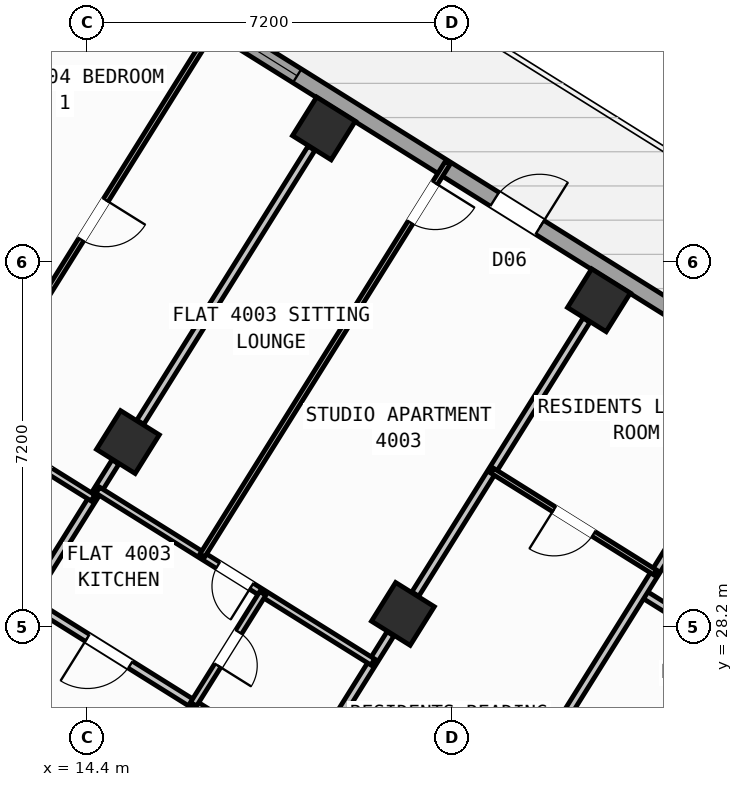
"""IFC4 building model, lengths in metres.
Left out: names, types, materials, properties, quantities, classifications, styles, units other than length and angle.
Written with IfcOpenShell. Run it as: python <this file> out.ifc"""

import sys

from ifc_helpers import new_model, si_unit, direction, frame, frame_2d, origin, origin_2d, place, context, subcontext, project, spatial, rectangle, hollow_rectangle, extrude, source, transform, mapped, element, fill, save


model = new_model("IFC4")
c1 = context("Model", 3, precision=1e-05, world=origin(), true_north=direction((0.0, 1.0)))
c2 = subcontext(c1, "Body", "Model", "MODEL_VIEW")
j1 = project(units=[si_unit("LENGTHUNIT", "METRE"), si_unit("PLANEANGLEUNIT", "RADIAN")], contexts=[c1])
p1 = place(None, origin())
s1 = spatial("IfcSite", under=j1, at=p1, CompositionType="ELEMENT")
p2 = place(p1, origin())
s2 = spatial("IfcBuilding", under=s1, at=p2, CompositionType="ELEMENT")
p3 = place(p2, frame((0.0, 0.0, 158.7)))
s3 = spatial("IfcBuildingStorey", under=s2, at=p3, CompositionType="ELEMENT", Elevation=158.7)
m1 = source(origin(), c2, "Body", "SweptSolid", [
    extrude(hollow_rectangle(XDim=0.9, YDim=0.9, WallThickness=0.036, at=origin_2d()), origin(), (0.0, 0.0, 1.0), 3.6),
])
for number, where, z_axis, x_axis in (
    (1, (24.5, 34.643, 0.0), (0.0, 0.0, 1.0), (-0.848, 0.53, 0.0)),
    (2, (20.632, 28.452, 0.0), (0.0, 0.0, 1.0), (-0.848, 0.53, 0.0)),
    (3, (19.073, 38.034, 0.0), (0.0, 0.0, 1.0), (-0.848, 0.53, 0.0)),
    (4, (15.205, 31.844, 0.0), (0.0, 0.0, 1.0), (-0.848, 0.53, 0.0)),
):
    element("IfcColumn", number, at=place(p3, frame(where, z_axis=z_axis, x_axis=x_axis)), inside=s3, PredefinedType="COLUMN", context=c2, shape_type="MappedRepresentation", body=[
        mapped(m1, transform((0.0, 0.0, 0.0), scale=1.0)),
    ])
p4 = place(p3, frame((2.415, 23.452, 0.0), z_axis=(0.0, 0.0, 1.0), x_axis=(0.52991049553, 0.848053575387, 0.0)))
e5 = element("IfcWall", 5, at=p4, inside=s3, PredefinedType="STANDARD", context=c2, shape_type="SweptSolid", body=[
    extrude(rectangle(XDim=21.587, YDim=0.32, at=frame_2d((10.794, 0.0))), origin(), (0.0, 0.0, 1.0), 2.775),
])
p5 = place(p4, frame((1.406, 0.0, 0.8)))
e6 = element("IfcOpeningElement", 6, at=p5, cuts=e5, PredefinedType="OPENING", context=c2, shape_type="SweptSolid", body=[
    extrude(rectangle(XDim=2.1, YDim=1.55, at=frame_2d((1.05, 0.775))), frame((0.0, 0.17, 0.0), z_axis=(0.0, -1.0, 0.0), x_axis=(1.0, 0.0, 0.0)), (0.0, 0.0, 1.0), 0.34),
])
p6 = place(p4, frame((10.949, 0.0, 1.0)))
e7 = element("IfcOpeningElement", 7, at=p6, cuts=e5, PredefinedType="OPENING", context=c2, shape_type="SweptSolid", body=[
    extrude(rectangle(XDim=0.9, YDim=1.25, at=frame_2d((0.45, 0.625))), frame((0.0, 0.17, 0.0), z_axis=(0.0, -1.0, 0.0), x_axis=(1.0, 0.0, 0.0)), (0.0, 0.0, 1.0), 0.34),
])
p7 = place(p4, frame((15.369, 0.0, 0.85)))
e8 = element("IfcOpeningElement", 8, at=p7, cuts=e5, PredefinedType="OPENING", context=c2, shape_type="SweptSolid", body=[
    extrude(rectangle(XDim=1.5, YDim=1.5, at=frame_2d((0.75, 0.75))), frame((0.0, 0.17, 0.0), z_axis=(0.0, -1.0, 0.0), x_axis=(1.0, 0.0, 0.0)), (0.0, 0.0, 1.0), 0.34),
])
p8 = place(p4, frame((18.219, 0.0, 0.85)))
e9 = element("IfcOpeningElement", 9, at=p8, cuts=e5, PredefinedType="OPENING", context=c2, shape_type="SweptSolid", body=[
    extrude(rectangle(XDim=1.5, YDim=1.5, at=frame_2d((0.75, 0.75))), frame((0.0, 0.17, 0.0), z_axis=(0.0, -1.0, 0.0), x_axis=(1.0, 0.0, 0.0)), (0.0, 0.0, 1.0), 0.34),
])
p9 = place(p3, frame((14.138, 41.825, 0.0), z_axis=(0.0, 0.0, 1.0), x_axis=(0.848046498049, -0.529921821731, 0.0)))
e10 = element("IfcWall", 10, at=p9, inside=s3, PredefinedType="STANDARD", context=c2, shape_type="SweptSolid", body=[
    extrude(rectangle(XDim=31.588, YDim=0.32, at=frame_2d((15.794, 0.0))), origin(), (0.0, 0.0, 1.0), 3.35),
])
p10 = place(p9, frame((9.792, 0.0, 0.0)))
e11 = element("IfcOpeningElement", 11, at=p10, cuts=e10, PredefinedType="OPENING", context=c2, shape_type="SweptSolid", body=[
    extrude(rectangle(XDim=1.05, YDim=2.15, at=frame_2d((0.525, 1.075))), frame((0.0, 0.17, 0.0), z_axis=(0.0, -1.0, 0.0), x_axis=(1.0, 0.0, 0.0)), (0.0, 0.0, 1.0), 0.34),
])
p11 = place(p9, frame((0.791, 0.0, 0.85)))
e12 = element("IfcOpeningElement", 12, at=p11, cuts=e10, PredefinedType="OPENING", context=c2, shape_type="SweptSolid", body=[
    extrude(rectangle(XDim=1.8, YDim=1.5, at=frame_2d((0.9, 0.75))), frame((0.0, 0.17, 0.0), z_axis=(0.0, -1.0, 0.0), x_axis=(1.0, 0.0, 0.0)), (0.0, 0.0, 1.0), 0.34),
])
p12 = place(p9, frame((3.996, 0.0, 0.95)))
e13 = element("IfcOpeningElement", 13, at=p12, cuts=e10, PredefinedType="OPENING", context=c2, shape_type="SweptSolid", body=[
    extrude(rectangle(XDim=1.2, YDim=1.4, at=frame_2d((0.6, 0.7))), frame((0.0, 0.17, 0.0), z_axis=(0.0, -1.0, 0.0), x_axis=(1.0, 0.0, 0.0)), (0.0, 0.0, 1.0), 0.34),
])
p13 = place(p9, frame((13.874, 0.0, 0.85)))
e14 = element("IfcOpeningElement", 14, at=p13, cuts=e10, PredefinedType="OPENING", context=c2, shape_type="SweptSolid", body=[
    extrude(rectangle(XDim=1.5, YDim=1.5, at=frame_2d((0.75, 0.75))), frame((0.0, 0.17, 0.0), z_axis=(0.0, -1.0, 0.0), x_axis=(1.0, 0.0, 0.0)), (0.0, 0.0, 1.0), 0.34),
])
p14 = place(p9, frame((17.104, 0.0, 1.0)))
e15 = element("IfcOpeningElement", 15, at=p14, cuts=e10, PredefinedType="OPENING", context=c2, shape_type="SweptSolid", body=[
    extrude(rectangle(XDim=0.9, YDim=1.25, at=frame_2d((0.45, 0.625))), frame((0.0, 0.17, 0.0), z_axis=(0.0, -1.0, 0.0), x_axis=(1.0, 0.0, 0.0)), (0.0, 0.0, 1.0), 0.34),
])
p15 = place(p9, frame((22.144, 0.0, 1.0)))
e16 = element("IfcOpeningElement", 16, at=p15, cuts=e10, PredefinedType="OPENING", context=c2, shape_type="SweptSolid", body=[
    extrude(rectangle(XDim=0.9, YDim=1.25, at=frame_2d((0.45, 0.625))), frame((0.0, 0.17, 0.0), z_axis=(0.0, -1.0, 0.0), x_axis=(1.0, 0.0, 0.0)), (0.0, 0.0, 1.0), 0.34),
])
p16 = place(p9, frame((27.744, 0.0, 1.0)))
e17 = element("IfcOpeningElement", 17, at=p16, cuts=e10, PredefinedType="OPENING", context=c2, shape_type="SweptSolid", body=[
    extrude(rectangle(XDim=0.9, YDim=1.25, at=frame_2d((0.45, 0.625))), frame((0.0, 0.17, 0.0), z_axis=(0.0, -1.0, 0.0), x_axis=(1.0, 0.0, 0.0)), (0.0, 0.0, 1.0), 0.34),
])
p17 = place(p3, frame((27.57, 27.478, 0.0), z_axis=(0.0, 0.0, 1.0), x_axis=(-0.848050851465, 0.529914854792, 0.0)))
e18 = element("IfcWall", 18, at=p17, inside=s3, PredefinedType="PARTITIONING", context=c2, shape_type="SweptSolid", body=[
    extrude(rectangle(XDim=2.61, YDim=0.16, at=frame_2d((1.305, 0.0))), origin(), (0.0, 0.0, 1.0), 3.34),
])
p18 = place(p17, frame((0.95, 0.0, 0.0)))
e19 = element("IfcOpeningElement", 19, at=p18, cuts=e18, PredefinedType="OPENING", context=c2, shape_type="SweptSolid", body=[
    extrude(rectangle(XDim=0.86, YDim=2.05, at=frame_2d((0.43, 1.025))), frame((0.0, 0.09, 0.0), z_axis=(0.0, -1.0, 0.0), x_axis=(1.0, 0.0, 0.0)), (0.0, 0.0, 1.0), 0.18),
])
p19 = place(p3, frame((27.953, 33.016, 0.0), z_axis=(0.0, 0.0, 1.0), x_axis=(-0.529905022231, -0.848056995381, 0.0)))
e20 = element("IfcWall", 20, at=p19, inside=s3, PredefinedType="PARTITIONING", context=c2, shape_type="SweptSolid", body=[
    extrude(rectangle(XDim=11.45, YDim=0.16, at=frame_2d((5.725, 0.0))), origin(), (0.0, 0.0, 1.0), 3.34),
])
p20 = place(p3, frame((21.885, 23.306, 0.0), z_axis=(0.0, 0.0, 1.0), x_axis=(-0.848052408131, 0.529912363569, 0.0)))
e21 = element("IfcWall", 21, at=p20, inside=s3, PredefinedType="PARTITIONING", context=c2, shape_type="SweptSolid", body=[
    extrude(rectangle(XDim=16.73, YDim=0.16, at=frame_2d((8.365, 0.0))), origin(), (0.0, 0.0, 1.0), 3.34),
])
p21 = place(p20, frame((1.395, 0.0, 0.0)))
e22 = element("IfcOpeningElement", 22, at=p21, cuts=e21, PredefinedType="OPENING", context=c2, shape_type="SweptSolid", body=[
    extrude(rectangle(XDim=1.0, YDim=2.1, at=frame_2d((0.5, 1.05))), frame((0.0, 0.09, 0.0), z_axis=(0.0, -1.0, 0.0), x_axis=(1.0, 0.0, 0.0)), (0.0, 0.0, 1.0), 0.18),
])
p22 = place(p20, frame((7.82, 0.0, 0.0)))
e23 = element("IfcOpeningElement", 23, at=p22, cuts=e21, PredefinedType="OPENING", context=c2, shape_type="SweptSolid", body=[
    extrude(rectangle(XDim=1.0, YDim=2.1, at=frame_2d((0.5, 1.05))), frame((0.0, 0.09, 0.0), z_axis=(0.0, -1.0, 0.0), x_axis=(1.0, 0.0, 0.0)), (0.0, 0.0, 1.0), 0.18),
])
p23 = place(p20, frame((11.14, 0.0, 0.0)))
e24 = element("IfcOpeningElement", 24, at=p23, cuts=e21, PredefinedType="OPENING", context=c2, shape_type="SweptSolid", body=[
    extrude(rectangle(XDim=1.0, YDim=2.1, at=frame_2d((0.5, 1.05))), frame((0.0, 0.09, 0.0), z_axis=(0.0, -1.0, 0.0), x_axis=(1.0, 0.0, 0.0)), (0.0, 0.0, 1.0), 0.18),
])
p24 = place(p3, frame((20.719, 21.44, 0.0), z_axis=(0.0, 0.0, 1.0), x_axis=(-0.848048310262, 0.529918921593, 0.0)))
e25 = element("IfcWall", 25, at=p24, inside=s3, PredefinedType="PARTITIONING", context=c2, shape_type="SweptSolid", body=[
    extrude(rectangle(XDim=16.73, YDim=0.16, at=frame_2d((8.365, 0.0))), origin(), (0.0, 0.0, 1.0), 3.34),
])
p25 = place(p24, frame((2.22, 0.0, 0.0)))
e26 = element("IfcOpeningElement", 26, at=p25, cuts=e25, PredefinedType="OPENING", context=c2, shape_type="SweptSolid", body=[
    extrude(rectangle(XDim=0.86, YDim=2.05, at=frame_2d((0.43, 1.025))), frame((0.0, 0.09, 0.0), z_axis=(0.0, -1.0, 0.0), x_axis=(1.0, 0.0, 0.0)), (0.0, 0.0, 1.0), 0.18),
])
p26 = place(p24, frame((6.49, 0.0, 0.0)))
e27 = element("IfcOpeningElement", 27, at=p26, cuts=e25, PredefinedType="OPENING", context=c2, shape_type="SweptSolid", body=[
    extrude(rectangle(XDim=1.0, YDim=2.1, at=frame_2d((0.5, 1.05))), frame((0.0, 0.09, 0.0), z_axis=(0.0, -1.0, 0.0), x_axis=(1.0, 0.0, 0.0)), (0.0, 0.0, 1.0), 0.18),
])
p27 = place(p24, frame((14.304, 0.0, 0.0)))
e28 = element("IfcOpeningElement", 28, at=p27, cuts=e25, PredefinedType="OPENING", context=c2, shape_type="SweptSolid", body=[
    extrude(rectangle(XDim=1.0, YDim=2.1, at=frame_2d((0.5, 1.05))), frame((0.0, 0.09, 0.0), z_axis=(0.0, -1.0, 0.0), x_axis=(1.0, 0.0, 0.0)), (0.0, 0.0, 1.0), 0.18),
])
p28 = place(p3, frame((24.256, 34.251, 0.0), z_axis=(0.0, 0.0, 1.0), x_axis=(-0.529919772691, -0.848047778437, 0.0)))
e29 = element("IfcWall", 29, at=p28, inside=s3, PredefinedType="PARTITIONING", context=c2, shape_type="SweptSolid", body=[
    extrude(rectangle(XDim=6.376, YDim=0.16, at=frame_2d((3.188, 0.0))), origin(), (0.0, 0.0, 1.0), 2.775),
])
p29 = place(p3, frame((20.387, 28.06, 0.0), z_axis=(0.0, 0.0, 1.0), x_axis=(-0.529890499457, -0.848066069705, 0.0)))
e30 = element("IfcWall", 30, at=p29, inside=s3, PredefinedType="PARTITIONING", context=c2, shape_type="SweptSolid", body=[
    extrude(rectangle(XDim=3.238, YDim=0.16, at=frame_2d((1.619, 0.0))), origin(), (0.0, 0.0, 1.0), 2.775),
])
p30 = place(p3, frame((25.612, 29.269, 0.0), z_axis=(0.0, 0.0, 1.0), x_axis=(-0.84803087207, 0.529946827537, 0.0)))
e31 = element("IfcWall", 31, at=p30, inside=s3, PredefinedType="PARTITIONING", context=c2, shape_type="SweptSolid", body=[
    extrude(rectangle(XDim=3.79, YDim=0.11, at=frame_2d((1.895, 0.0))), origin(), (0.0, 0.0, 1.0), 3.34),
])
p31 = place(p30, frame((1.435, 0.0, 0.0)))
e32 = element("IfcOpeningElement", 32, at=p31, cuts=e31, PredefinedType="OPENING", context=c2, shape_type="SweptSolid", body=[
    extrude(rectangle(XDim=0.92, YDim=2.08, at=frame_2d((0.46, 1.04))), frame((0.0, 0.065, 0.0), z_axis=(0.0, -1.0, 0.0), x_axis=(1.0, 0.0, 0.0)), (0.0, 0.0, 1.0), 0.13),
])
p32 = place(p3, frame((18.828, 37.643, 0.0), z_axis=(0.0, 0.0, 1.0), x_axis=(-0.529930102756, -0.848041323399, 0.0)))
e33 = element("IfcWall", 33, at=p32, inside=s3, PredefinedType="PARTITIONING", context=c2, shape_type="SweptSolid", body=[
    extrude(rectangle(XDim=6.376, YDim=0.16, at=frame_2d((3.188, 0.0))), origin(), (0.0, 0.0, 1.0), 2.775),
])
p33 = place(p3, frame((14.96, 31.452, 0.0), z_axis=(0.0, 0.0, 1.0), x_axis=(-0.529924383291, -0.848044897393, 0.0)))
e34 = element("IfcWall", 34, at=p33, inside=s3, PredefinedType="PARTITIONING", context=c2, shape_type="SweptSolid", body=[
    extrude(rectangle(XDim=3.238, YDim=0.16, at=frame_2d((1.619, 0.0))), origin(), (0.0, 0.0, 1.0), 2.775),
])
p34 = place(p3, frame((20.039, 27.502, 0.0), z_axis=(0.0, 0.0, 1.0), x_axis=(-0.848039019877, 0.529933789039, 0.0)))
e35 = element("IfcWall", 35, at=p34, inside=s3, PredefinedType="PLUMBINGWALL", context=c2, shape_type="SweptSolid", body=[
    extrude(rectangle(XDim=6.4, YDim=0.14, at=frame_2d((3.2, 0.0))), origin(), (0.0, 0.0, 1.0), 3.34),
])
p35 = place(p34, frame((2.824, 0.0, 0.0)))
e36 = element("IfcOpeningElement", 36, at=p35, cuts=e35, PredefinedType="OPENING", context=c2, shape_type="SweptSolid", body=[
    extrude(rectangle(XDim=0.78, YDim=2.05, at=frame_2d((0.39, 1.025))), frame((0.0, 0.08, 0.0), z_axis=(0.0, -1.0, 0.0), x_axis=(1.0, 0.0, 0.0)), (0.0, 0.0, 1.0), 0.16),
])
p36 = place(p3, frame((17.867, 28.859, 0.0), z_axis=(0.0, 0.0, 1.0), x_axis=(-0.529913878929, -0.848051461244, 0.0)))
e37 = element("IfcWall", 37, at=p36, inside=s3, PredefinedType="PLUMBINGWALL", context=c2, shape_type="SweptSolid", body=[
    extrude(rectangle(XDim=2.58, YDim=0.14, at=frame_2d((1.29, 0.0))), origin(), (0.0, 0.0, 1.0), 3.34),
])
p37 = place(p36, frame((0.9, 0.0, 0.0)))
e38 = element("IfcOpeningElement", 38, at=p37, cuts=e37, PredefinedType="OPENING", context=c2, shape_type="SweptSolid", body=[
    extrude(rectangle(XDim=0.78, YDim=2.05, at=frame_2d((0.39, 1.025))), frame((0.0, 0.08, 0.0), z_axis=(0.0, -1.0, 0.0), x_axis=(1.0, 0.0, 0.0)), (0.0, 0.0, 1.0), 0.16),
])
p38 = place(p3, frame((21.517, 37.356, 0.0), z_axis=(0.0, 0.0, 1.0), x_axis=(-0.529919705034, -0.848047820713, 0.0)))
e39 = element("IfcWall", 39, at=p38, inside=s3, PredefinedType="PARTITIONING", context=c2, shape_type="SweptSolid", body=[
    extrude(rectangle(XDim=9.14, YDim=0.11, at=frame_2d((4.57, 0.0))), origin(), (0.0, 0.0, 1.0), 3.34),
])
p39 = place(p38, frame((0.47, 0.0, 0.0)))
e40 = element("IfcOpeningElement", 40, at=p39, cuts=e39, PredefinedType="OPENING", context=c2, shape_type="SweptSolid", body=[
    extrude(rectangle(XDim=0.92, YDim=2.08, at=frame_2d((0.46, 1.04))), frame((0.0, 0.065, 0.0), z_axis=(0.0, -1.0, 0.0), x_axis=(1.0, 0.0, 0.0)), (0.0, 0.0, 1.0), 0.13),
])
p40 = place(p3, frame((16.995, 40.182, 0.0), z_axis=(0.0, 0.0, 1.0), x_axis=(-0.529927783988, -0.848042772363, 0.0)))
e41 = element("IfcWall", 41, at=p40, inside=s3, PredefinedType="PARTITIONING", context=c2, shape_type="SweptSolid", body=[
    extrude(rectangle(XDim=11.72, YDim=0.11, at=frame_2d((5.86, 0.0))), origin(), (0.0, 0.0, 1.0), 3.34),
])
p41 = place(p40, frame((10.08, 0.0, 0.0)))
e42 = element("IfcOpeningElement", 42, at=p41, cuts=e41, PredefinedType="OPENING", context=c2, shape_type="SweptSolid", body=[
    extrude(rectangle(XDim=0.78, YDim=2.05, at=frame_2d((0.39, 1.025))), frame((0.0, 0.065, 0.0), z_axis=(0.0, -1.0, 0.0), x_axis=(1.0, 0.0, 0.0)), (0.0, 0.0, 1.0), 0.13),
])
p42 = place(p40, frame((4.2, 0.0, 0.0)))
e43 = element("IfcOpeningElement", 43, at=p42, cuts=e41, PredefinedType="OPENING", context=c2, shape_type="SweptSolid", body=[
    extrude(rectangle(XDim=0.92, YDim=2.08, at=frame_2d((0.46, 1.04))), frame((0.0, 0.065, 0.0), z_axis=(0.0, -1.0, 0.0), x_axis=(1.0, 0.0, 0.0)), (0.0, 0.0, 1.0), 0.13),
])
p43 = place(p3, frame((14.516, 30.741, 0.0), z_axis=(0.0, 0.0, 1.0), x_axis=(-0.848059786386, 0.529900555496, 0.0)))
e44 = element("IfcWall", 44, at=p43, inside=s3, PredefinedType="PLUMBINGWALL", context=c2, shape_type="SweptSolid", body=[
    extrude(rectangle(XDim=2.9, YDim=0.14, at=frame_2d((1.45, 0.0))), origin(), (0.0, 0.0, 1.0), 3.34),
])
p44 = place(p43, frame((0.99, 0.0, 0.0)))
e45 = element("IfcOpeningElement", 45, at=p44, cuts=e44, PredefinedType="OPENING", context=c2, shape_type="SweptSolid", body=[
    extrude(rectangle(XDim=0.92, YDim=2.08, at=frame_2d((0.46, 1.04))), frame((0.0, 0.08, 0.0), z_axis=(0.0, -1.0, 0.0), x_axis=(1.0, 0.0, 0.0)), (0.0, 0.0, 1.0), 0.16),
])
m2 = source(origin(), c2, "Body", "SweptSolid", [
    extrude(rectangle(XDim=1.05, YDim=2.15, at=frame_2d((0.525, 1.075))), frame((0.0, 0.025, 0.0), z_axis=(0.0, -1.0, 0.0), x_axis=(1.0, 0.0, 0.0)), (0.0, 0.0, 1.0), 0.05),
])
p45 = place(p10, origin())
e46 = element("IfcDoor", 46, at=p45, inside=s3, OperationType="SINGLE_SWING_RIGHT", PredefinedType="DOOR", context=c2, shape_type="MappedRepresentation", body=[
    mapped(m2, transform((0.0, 0.0, 0.0), scale=1.0)),
])
fill(e11, e46)
m3 = source(origin(), c2, "Body", "SweptSolid", [
    extrude(rectangle(XDim=1.2, YDim=1.4, at=frame_2d((0.6, 0.7))), frame((0.0, 0.03, 0.0), z_axis=(0.0, -1.0, 0.0), x_axis=(1.0, 0.0, 0.0)), (0.0, 0.0, 1.0), 0.06),
])
p46 = place(p12, origin())
e47 = element("IfcWindow", 47, at=p46, inside=s3, PartitioningType="SINGLE_PANEL", PredefinedType="WINDOW", context=c2, shape_type="MappedRepresentation", body=[
    mapped(m3, transform((0.0, 0.0, 0.0), scale=1.0)),
])
fill(e13, e47)
m4 = source(origin(), c2, "Body", "SweptSolid", [
    extrude(rectangle(XDim=0.92, YDim=2.08, at=frame_2d((0.46, 1.04))), frame((0.0, 0.025, 0.0), z_axis=(0.0, -1.0, 0.0), x_axis=(1.0, 0.0, 0.0)), (0.0, 0.0, 1.0), 0.05),
])
p47 = place(p31, origin())
e48 = element("IfcDoor", 48, at=p47, inside=s3, OperationType="SINGLE_SWING_RIGHT", PredefinedType="DOOR", context=c2, shape_type="MappedRepresentation", body=[
    mapped(m4, transform((0.0, 0.0, 0.0), scale=1.0)),
])
fill(e32, e48)
p48 = place(p39, origin())
e49 = element("IfcDoor", 49, at=p48, inside=s3, OperationType="SINGLE_SWING_LEFT", PredefinedType="DOOR", context=c2, shape_type="MappedRepresentation", body=[
    mapped(m4, transform((0.0, 0.0, 0.0), scale=1.0)),
])
fill(e40, e49)
m5 = source(origin(), c2, "Body", "SweptSolid", [
    extrude(rectangle(XDim=1.0, YDim=2.1, at=frame_2d((0.5, 1.05))), frame((0.0, 0.025, 0.0), z_axis=(0.0, -1.0, 0.0), x_axis=(1.0, 0.0, 0.0)), (0.0, 0.0, 1.0), 0.05),
])
p49 = place(p22, origin())
e50 = element("IfcDoor", 50, at=p49, inside=s3, OperationType="SINGLE_SWING_RIGHT", PredefinedType="DOOR", context=c2, shape_type="MappedRepresentation", body=[
    mapped(m5, transform((0.0, 0.0, 0.0), scale=1.0)),
])
fill(e23, e50)
m6 = source(origin(), c2, "Body", "SweptSolid", [
    extrude(rectangle(XDim=0.78, YDim=2.05, at=frame_2d((0.39, 1.025))), frame((0.0, 0.025, 0.0), z_axis=(0.0, -1.0, 0.0), x_axis=(1.0, 0.0, 0.0)), (0.0, 0.0, 1.0), 0.05),
])
p50 = place(p35, origin())
e51 = element("IfcDoor", 51, at=p50, inside=s3, OperationType="SINGLE_SWING_LEFT", PredefinedType="DOOR", context=c2, shape_type="MappedRepresentation", body=[
    mapped(m6, transform((0.0, 0.0, 0.0), scale=1.0)),
])
fill(e36, e51)
p51 = place(p37, origin())
e52 = element("IfcDoor", 52, at=p51, inside=s3, OperationType="SINGLE_SWING_RIGHT", PredefinedType="DOOR", context=c2, shape_type="MappedRepresentation", body=[
    mapped(m6, transform((0.0, 0.0, 0.0), scale=1.0)),
])
fill(e38, e52)
p52 = place(p42, origin())
e53 = element("IfcDoor", 53, at=p52, inside=s3, OperationType="SINGLE_SWING_LEFT", PredefinedType="DOOR", context=c2, shape_type="MappedRepresentation", body=[
    mapped(m4, transform((0.0, 0.0, 0.0), scale=1.0)),
])
fill(e43, e53)
save(model, sys.argv[1])
